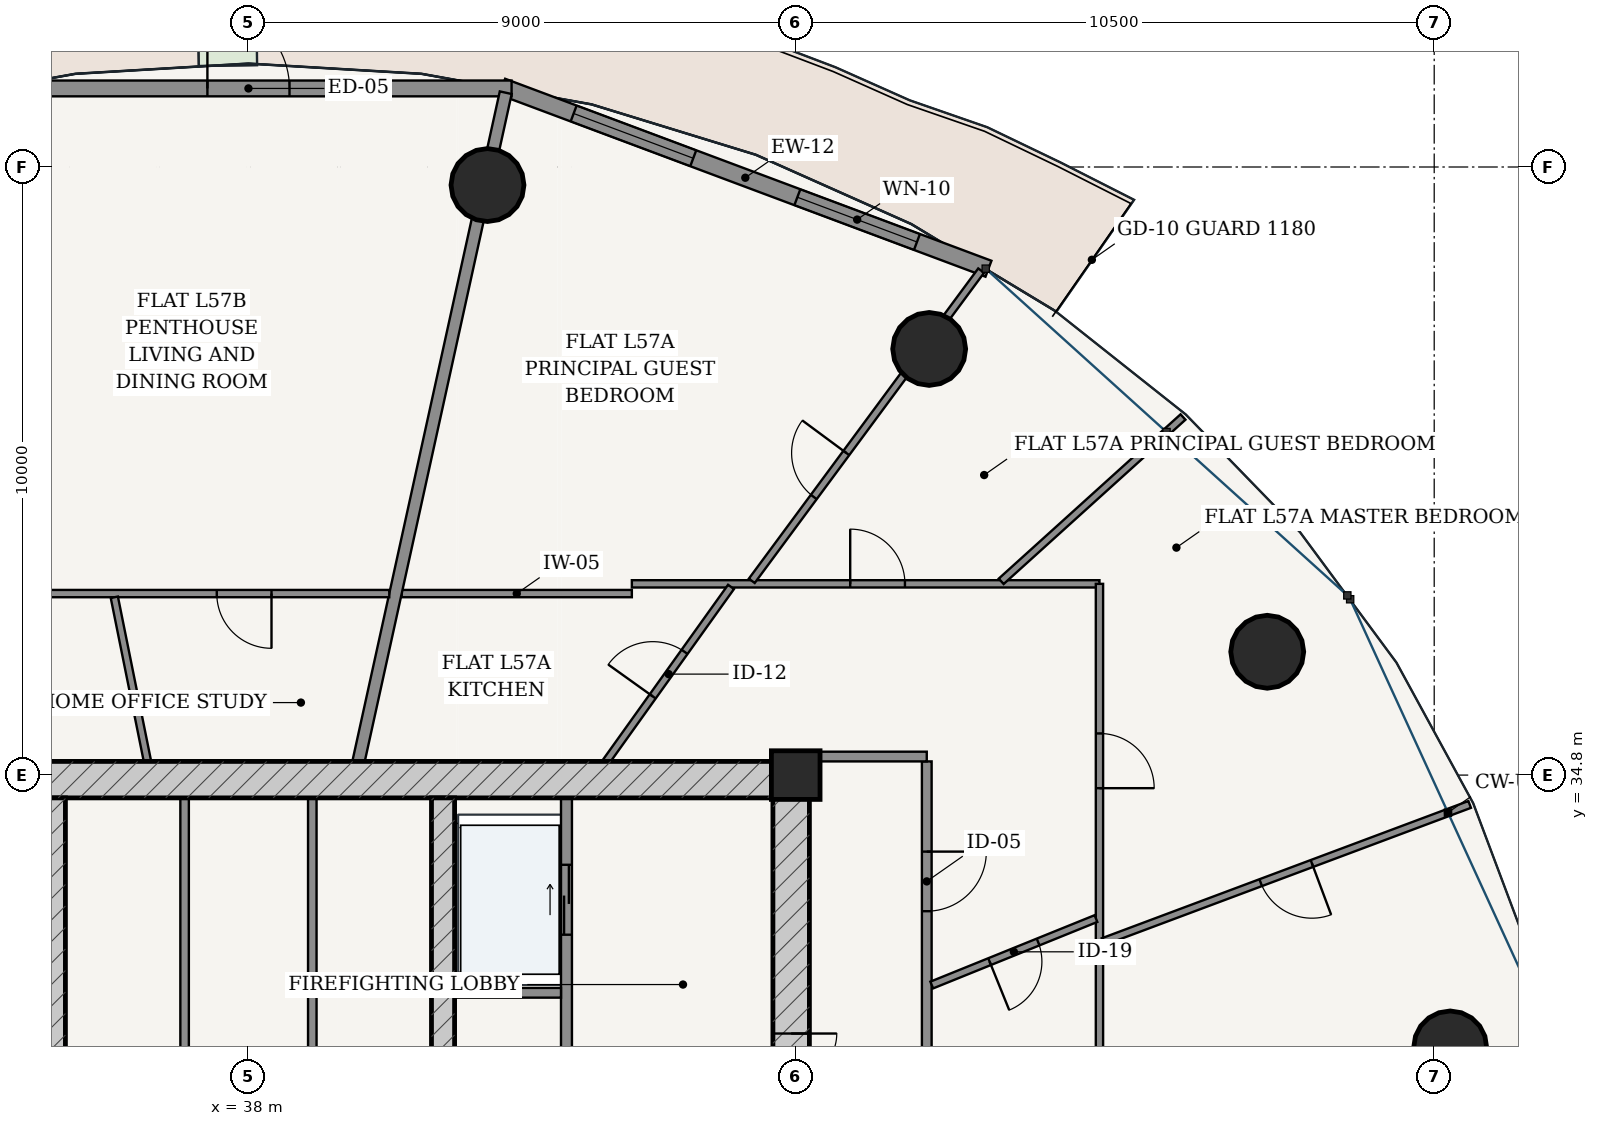
"""IFC4 building model, lengths in metres.
Left out: names, types, materials, properties, quantities, classifications, styles, units other than length and angle.
Written with IfcOpenShell. Run it as: python <this file> out.ifc"""

import sys

from ifc_helpers import new_model, si_unit, direction, frame, frame_2d, origin, origin_2d, place, context, subcontext, project, spatial, rectangle, hollow_circle, extrude, source, transform, mapped, element, fill, save


model = new_model("IFC4")
c1 = context("Model", 3, precision=1e-05, world=origin(), true_north=direction((-0.2419218956, 0.970295726276)))
c2 = subcontext(c1, "Body", "Model", "MODEL_VIEW")
j1 = project(units=[si_unit("LENGTHUNIT", "METRE"), si_unit("PLANEANGLEUNIT", "RADIAN")], contexts=[c1])
p1 = place(None, origin())
s1 = spatial("IfcSite", under=j1, at=p1, CompositionType="ELEMENT")
p2 = place(p1, origin())
s2 = spatial("IfcBuilding", under=s1, at=p2, CompositionType="ELEMENT")
p3 = place(p2, frame((0.0, 0.0, 217.1)))
s3 = spatial("IfcBuildingStorey", under=s2, at=p3, CompositionType="ELEMENT", Elevation=217.1)
p4 = place(p3, frame((47.0, 34.8, 0.0), z_axis=(0.0, 0.0, 1.0), x_axis=(1.0, 0.0, 0.0)))
e1 = element("IfcColumn", 1, at=p4, inside=s3, PredefinedType="COLUMN", context=c2, shape_type="SweptSolid", body=[
    extrude(rectangle(XDim=0.8, YDim=0.8, at=origin_2d()), origin(), (0.0, 0.0, 1.0), 3.7),
])
p5 = place(p3, frame((28.775, 34.725, 0.0), z_axis=(0.0, 0.0, 1.0), x_axis=(1.0, 0.0, 0.0)))
e2 = element("IfcWall", 2, at=p5, inside=s3, PredefinedType="SHEAR", context=c2, shape_type="SweptSolid", body=[
    extrude(rectangle(XDim=18.45, YDim=0.6, at=frame_2d((9.225, 0.0))), origin(), (0.0, 0.0, 1.0), 3.435),
])
p6 = place(p3, frame((46.925, 19.175, 0.0), z_axis=(0.0, 0.0, 1.0), x_axis=(0.0, 1.0, 0.0)))
e3 = element("IfcWall", 3, at=p6, inside=s3, PredefinedType="SHEAR", context=c2, shape_type="SweptSolid", body=[
    extrude(rectangle(XDim=15.25, YDim=0.6, at=frame_2d((7.625, 0.0))), origin(), (0.0, 0.0, 1.0), 3.435),
])
p7 = place(p6, frame((9.875, 0.0, 0.0)))
e4 = element("IfcOpeningElement", 4, at=p7, cuts=e3, PredefinedType="OPENING", context=c2, shape_type="SweptSolid", body=[
    extrude(rectangle(XDim=1.5, YDim=2.2, at=frame_2d((0.75, 1.1))), frame((0.0, 0.31, 0.0), z_axis=(0.0, -1.0, 0.0), x_axis=(1.0, 0.0, 0.0)), (0.0, 0.0, 1.0), 0.62),
])
p8 = place(p3, frame((34.8, 19.175, 0.0), z_axis=(0.0, 0.0, 1.0), x_axis=(0.0, 1.0, 0.0)))
e5 = element("IfcWall", 5, at=p8, inside=s3, PredefinedType="SHEAR", context=c2, shape_type="SweptSolid", body=[
    extrude(rectangle(XDim=15.25, YDim=0.38, at=frame_2d((7.625, 0.0))), origin(), (0.0, 0.0, 1.0), 3.435),
])
p9 = place(p8, frame((7.8, 0.0, 0.0)))
e6 = element("IfcOpeningElement", 6, at=p9, cuts=e5, PredefinedType="OPENING", context=c2, shape_type="SweptSolid", body=[
    extrude(rectangle(XDim=1.05, YDim=2.15, at=frame_2d((0.525, 1.075))), frame((0.0, 0.2, 0.0), z_axis=(0.0, -1.0, 0.0), x_axis=(1.0, 0.0, 0.0)), (0.0, 0.0, 1.0), 0.4),
])
p10 = place(p3, frame((41.2, 19.175, 0.0), z_axis=(0.0, 0.0, 1.0), x_axis=(0.0, 1.0, 0.0)))
e7 = element("IfcWall", 7, at=p10, inside=s3, PredefinedType="SHEAR", context=c2, shape_type="SweptSolid", body=[
    extrude(rectangle(XDim=15.25, YDim=0.38, at=frame_2d((7.625, 0.0))), origin(), (0.0, 0.0, 1.0), 3.435),
])
p11 = place(p10, frame((7.8, 0.0, 0.0)))
e8 = element("IfcOpeningElement", 8, at=p11, cuts=e7, PredefinedType="OPENING", context=c2, shape_type="SweptSolid", body=[
    extrude(rectangle(XDim=1.05, YDim=2.15, at=frame_2d((0.525, 1.075))), frame((0.0, 0.2, 0.0), z_axis=(0.0, -1.0, 0.0), x_axis=(1.0, 0.0, 0.0)), (0.0, 0.0, 1.0), 0.4),
])
for number, where, z_axis, x_axis in (
    (9, (57.763, 30.321, 0.0), (0.0, 0.0, 1.0), (1.0, 0.0, 0.0)),
    (10, (54.754, 36.828, 0.0), (0.0, 0.0, 1.0), (1.0, 0.0, 0.0)),
    (11, (49.195, 41.808, 0.0), (0.0, 0.0, 1.0), (1.0, 0.0, 0.0)),
    (12, (41.931, 44.503, 0.0), (0.0, 0.0, 1.0), (1.0, 0.0, 0.0)),
):
    element("IfcColumn", number, at=place(p3, frame(where, z_axis=z_axis, x_axis=x_axis)), inside=s3, PredefinedType="COLUMN", context=c2, shape_type="SweptSolid", body=[
        extrude(hollow_circle(Radius=0.6, WallThickness=0.038, at=origin_2d()), origin(), (0.0, 0.0, 1.0), 3.7),
    ])
p12 = place(p3, frame((50.17, 43.127, 0.0), z_axis=(0.0, 0.0, 1.0), x_axis=(-0.936556918375, 0.350515532672, 0.0)))
e13 = element("IfcWall", 13, at=p12, inside=s3, PredefinedType="SOLIDWALL", context=c2, shape_type="SweptSolid", body=[
    extrude(rectangle(XDim=8.539, YDim=0.28, at=frame_2d((4.27, 0.0))), origin(), (0.0, 0.0, 1.0), 3.435),
])
p13 = place(p12, frame((1.256, 0.0, 0.85)))
e14 = element("IfcOpeningElement", 14, at=p13, cuts=e13, PredefinedType="OPENING", context=c2, shape_type="SweptSolid", body=[
    extrude(rectangle(XDim=2.1, YDim=1.95, at=frame_2d((1.05, 0.975))), frame((0.0, 0.15, 0.0), z_axis=(0.0, -1.0, 0.0), x_axis=(1.0, 0.0, 0.0)), (0.0, 0.0, 1.0), 0.3),
])
p14 = place(p12, frame((5.184, 0.0, 0.85)))
e15 = element("IfcOpeningElement", 15, at=p14, cuts=e13, PredefinedType="OPENING", context=c2, shape_type="SweptSolid", body=[
    extrude(rectangle(XDim=2.1, YDim=1.95, at=frame_2d((1.05, 0.975))), frame((0.0, 0.15, 0.0), z_axis=(0.0, -1.0, 0.0), x_axis=(1.0, 0.0, 0.0)), (0.0, 0.0, 1.0), 0.3),
])
p15 = place(p3, frame((42.327, 46.092, 0.0), z_axis=(0.0, 0.0, 1.0), x_axis=(-1.0, 0.0, 0.0)))
e16 = element("IfcWall", 16, at=p15, inside=s3, PredefinedType="SOLIDWALL", context=c2, shape_type="SweptSolid", body=[
    extrude(rectangle(XDim=8.654, YDim=0.26, at=frame_2d((4.327, 0.0))), origin(), (0.0, 0.0, 1.0), 3.435),
])
p16 = place(p15, frame((3.652, 0.0, 0.0)))
e17 = element("IfcOpeningElement", 17, at=p16, cuts=e16, PredefinedType="OPENING", context=c2, shape_type="SweptSolid", body=[
    extrude(rectangle(XDim=1.35, YDim=2.2, at=frame_2d((0.675, 1.1))), frame((0.0, 0.14, 0.0), z_axis=(0.0, -1.0, 0.0), x_axis=(1.0, 0.0, 0.0)), (0.0, 0.0, 1.0), 0.28),
])
p17 = place(p3, frame((43.23, 28.52, 0.0), z_axis=(0.0, 0.0, 1.0), x_axis=(0.0, 1.0, 0.0)))
e18 = element("IfcWall", 18, at=p17, inside=s3, PredefinedType="PARTITIONING", context=c2, shape_type="SweptSolid", body=[
    extrude(rectangle(XDim=5.905, YDim=0.18, at=frame_2d((2.953, 0.0))), origin(), (0.0, 0.0, 1.0), 3.435),
])
p18 = place(p17, frame((0.905, 0.0, 0.0)))
e19 = element("IfcOpeningElement", 19, at=p18, cuts=e18, PredefinedType="OPENING", context=c2, shape_type="SweptSolid", body=[
    extrude(rectangle(XDim=0.85, YDim=2.1, at=frame_2d((0.425, 1.05))), frame((0.0, 0.1, 0.0), z_axis=(0.0, -1.0, 0.0), x_axis=(1.0, 0.0, 0.0)), (0.0, 0.0, 1.0), 0.2),
])
p19 = place(p17, frame((3.655, 0.0, 0.0)))
e20 = element("IfcOpeningElement", 20, at=p19, cuts=e18, PredefinedType="OPENING", context=c2, shape_type="SweptSolid", body=[
    extrude(rectangle(XDim=1.15, YDim=2.2, at=frame_2d((0.575, 1.1))), frame((0.0, 0.1, 0.0), z_axis=(0.0, -1.0, 0.0), x_axis=(1.0, 0.0, 0.0)), (0.0, 0.0, 1.0), 0.2),
])
p20 = place(p3, frame((41.39, 31.22, 0.0), z_axis=(0.0, 0.0, 1.0), x_axis=(1.0, 0.0, 0.0)))
e21 = element("IfcWall", 21, at=p20, inside=s3, PredefinedType="PARTITIONING", context=c2, shape_type="SweptSolid", body=[
    extrude(rectangle(XDim=1.75, YDim=0.16, at=frame_2d((0.875, 0.0))), origin(), (0.0, 0.0, 1.0), 3.435),
])
for number, where, z_axis, x_axis in (
    (22, (36.95, 28.56, 0.0), (0.0, 0.0, 1.0), (0.0, 1.0, 0.0)),
    (23, (39.05, 28.56, 0.0), (0.0, 0.0, 1.0), (0.0, 1.0, 0.0)),
):
    element("IfcWall", number, at=place(p3, frame(where, z_axis=z_axis, x_axis=x_axis)), inside=s3, PredefinedType="PARTITIONING", context=c2, shape_type="SweptSolid", body=[
        extrude(rectangle(XDim=5.865, YDim=0.14, at=frame_2d((2.933, 0.0))), origin(), (0.0, 0.0, 1.0), 3.435),
    ])
p21 = place(p3, frame((49.155, 16.725, 0.0), z_axis=(0.0, 0.0, 1.0), x_axis=(0.0, 1.0, 0.0)))
e24 = element("IfcWall", 24, at=p21, inside=s3, PredefinedType="PARTITIONING", context=c2, shape_type="SweptSolid", body=[
    extrude(rectangle(XDim=18.3, YDim=0.16, at=frame_2d((9.15, 0.0))), origin(), (0.0, 0.0, 1.0), 2.951),
])
p22 = place(p21, frame((15.837, 0.0, 0.0)))
e25 = element("IfcOpeningElement", 25, at=p22, cuts=e24, PredefinedType="OPENING", context=c2, shape_type="SweptSolid", body=[
    extrude(rectangle(XDim=0.98, YDim=2.2, at=frame_2d((0.49, 1.1))), frame((0.0, 0.09, 0.0), z_axis=(0.0, -1.0, 0.0), x_axis=(1.0, 0.0, 0.0)), (0.0, 0.0, 1.0), 0.18),
])
p23 = place(p3, frame((47.225, 35.105, 0.0), z_axis=(0.0, 0.0, 1.0), x_axis=(1.0, 0.0, 0.0)))
e26 = element("IfcWall", 26, at=p23, inside=s3, PredefinedType="PARTITIONING", context=c2, shape_type="SweptSolid", body=[
    extrude(rectangle(XDim=1.93, YDim=0.16, at=frame_2d((0.965, 0.0))), origin(), (0.0, 0.0, 1.0), 3.435),
])
p24 = place(p3, frame((40.52, 37.785, 0.0), z_axis=(0.0, 0.0, 1.0), x_axis=(1.0, 0.0, 0.0)))
e27 = element("IfcWall", 27, at=p24, inside=s3, PredefinedType="PARTITIONING", context=c2, shape_type="SweptSolid", body=[
    extrude(rectangle(XDim=3.785, YDim=0.12, at=frame_2d((1.893, 0.0))), origin(), (0.0, 0.0, 1.0), 2.951),
])
p25 = place(p3, frame((44.305, 37.945, 0.0), z_axis=(0.0, 0.0, 1.0), x_axis=(1.0, 0.0, 0.0)))
e28 = element("IfcWall", 28, at=p25, inside=s3, PredefinedType="PARTITIONING", context=c2, shape_type="SweptSolid", body=[
    extrude(rectangle(XDim=7.69, YDim=0.12, at=frame_2d((3.845, 0.0))), origin(), (0.0, 0.0, 1.0), 2.951),
])
p26 = place(p25, frame((3.591, 0.0, 0.0)))
e29 = element("IfcOpeningElement", 29, at=p26, cuts=e28, PredefinedType="OPENING", context=c2, shape_type="SweptSolid", body=[
    extrude(rectangle(XDim=0.9, YDim=2.15, at=frame_2d((0.45, 1.075))), frame((0.0, 0.07, 0.0), z_axis=(0.0, -1.0, 0.0), x_axis=(1.0, 0.0, 0.0)), (0.0, 0.0, 1.0), 0.14),
])
p27 = place(p3, frame((51.995, 37.945, 0.0), z_axis=(0.0, 0.0, 1.0), x_axis=(0.0, -1.0, 0.0)))
e30 = element("IfcWall", 30, at=p27, inside=s3, PredefinedType="PARTITIONING", context=c2, shape_type="SweptSolid", body=[
    extrude(rectangle(XDim=11.043, YDim=0.12, at=frame_2d((5.521, 0.0))), origin(), (0.0, 0.0, 1.0), 2.951),
])
p28 = place(p27, frame((2.46, 0.0, 0.0)))
e31 = element("IfcOpeningElement", 31, at=p28, cuts=e30, PredefinedType="OPENING", context=c2, shape_type="SweptSolid", body=[
    extrude(rectangle(XDim=0.9, YDim=2.15, at=frame_2d((0.45, 1.075))), frame((0.0, 0.07, 0.0), z_axis=(0.0, -1.0, 0.0), x_axis=(1.0, 0.0, 0.0)), (0.0, 0.0, 1.0), 0.14),
])
p29 = place(p3, frame((52.053, 32.06, 0.0), z_axis=(0.0, 0.0, 1.0), x_axis=(0.936547148815, 0.350541635255, 0.0)))
e32 = element("IfcWall", 32, at=p29, inside=s3, PredefinedType="PARTITIONING", context=c2, shape_type="SweptSolid", body=[
    extrude(rectangle(XDim=6.439, YDim=0.12, at=frame_2d((3.219, 0.0))), origin(), (0.0, 0.0, 1.0), 2.951),
])
p30 = place(p29, frame((2.769, 0.0, 0.0)))
e33 = element("IfcOpeningElement", 33, at=p30, cuts=e32, PredefinedType="OPENING", context=c2, shape_type="SweptSolid", body=[
    extrude(rectangle(XDim=0.9, YDim=2.15, at=frame_2d((0.45, 1.075))), frame((0.0, 0.07, 0.0), z_axis=(0.0, -1.0, 0.0), x_axis=(1.0, 0.0, 0.0)), (0.0, 0.0, 1.0), 0.14),
])
p31 = place(p3, frame((50.379, 37.987, 0.0), z_axis=(0.0, 0.0, 1.0), x_axis=(0.741946116474, 0.67045951425, 0.0)))
e34 = element("IfcWall", 34, at=p31, inside=s3, PredefinedType="PARTITIONING", context=c2, shape_type="SweptSolid", body=[
    extrude(rectangle(XDim=4.03, YDim=0.12, at=frame_2d((2.015, 0.0))), origin(), (0.0, 0.0, 1.0), 2.951),
])
p32 = place(p3, frame((46.278, 37.995, 0.0), z_axis=(0.0, 0.0, 1.0), x_axis=(0.594518724985, 0.80408176552, 0.0)))
e35 = element("IfcWall", 35, at=p32, inside=s3, PredefinedType="PARTITIONING", context=c2, shape_type="SweptSolid", body=[
    extrude(rectangle(XDim=6.344, YDim=0.12, at=frame_2d((3.172, 0.0))), origin(), (0.0, 0.0, 1.0), 2.951),
])
p33 = place(p32, frame((1.715, 0.0, 0.0)))
e36 = element("IfcOpeningElement", 36, at=p33, cuts=e35, PredefinedType="OPENING", context=c2, shape_type="SweptSolid", body=[
    extrude(rectangle(XDim=0.9, YDim=2.15, at=frame_2d((0.45, 1.075))), frame((0.0, 0.07, 0.0), z_axis=(0.0, -1.0, 0.0), x_axis=(1.0, 0.0, 0.0)), (0.0, 0.0, 1.0), 0.14),
])
p34 = place(p3, frame((49.237, 31.347, 0.0), z_axis=(0.0, 0.0, 1.0), x_axis=(0.926960690293, 0.375158471383, 0.0)))
e37 = element("IfcWall", 37, at=p34, inside=s3, PredefinedType="PARTITIONING", context=c2, shape_type="SweptSolid", body=[
    extrude(rectangle(XDim=2.914, YDim=0.12, at=frame_2d((1.457, 0.0))), origin(), (0.0, 0.0, 1.0), 3.11),
])
p35 = place(p34, frame((1.027, 0.0, 0.0)))
e38 = element("IfcOpeningElement", 38, at=p35, cuts=e37, PredefinedType="OPENING", context=c2, shape_type="SweptSolid", body=[
    extrude(rectangle(XDim=0.86, YDim=2.15, at=frame_2d((0.43, 1.075))), frame((0.0, 0.07, 0.0), z_axis=(0.0, -1.0, 0.0), x_axis=(1.0, 0.0, 0.0)), (0.0, 0.0, 1.0), 0.14),
])
p36 = place(p3, frame((43.885, 35.027, 0.0), z_axis=(0.0, 0.0, 1.0), x_axis=(0.581801309538, 0.813330951225, 0.0)))
e39 = element("IfcWall", 39, at=p36, inside=s3, PredefinedType="PARTITIONING", context=c2, shape_type="SweptSolid", body=[
    extrude(rectangle(XDim=3.526, YDim=0.12, at=frame_2d((1.763, 0.0))), origin(), (0.0, 0.0, 1.0), 3.435),
])
p37 = place(p36, frame((1.313, 0.0, 0.0)))
e40 = element("IfcOpeningElement", 40, at=p37, cuts=e39, PredefinedType="OPENING", context=c2, shape_type="SweptSolid", body=[
    extrude(rectangle(XDim=0.9, YDim=2.15, at=frame_2d((0.45, 1.075))), frame((0.0, 0.07, 0.0), z_axis=(0.0, -1.0, 0.0), x_axis=(1.0, 0.0, 0.0)), (0.0, 0.0, 1.0), 0.14),
])
p38 = place(p3, frame((39.811, 35.027, 0.0), z_axis=(0.0, 0.0, 1.0), x_axis=(0.214966857327, 0.976621344356, 0.0)))
e41 = element("IfcWall", 41, at=p38, inside=s3, PredefinedType="PARTITIONING", context=c2, shape_type="SweptSolid", body=[
    extrude(rectangle(XDim=11.258, YDim=0.2, at=frame_2d((5.629, 0.0))), origin(), (0.0, 0.0, 1.0), 2.52),
])
p39 = place(p3, frame((31.695, 37.785, 0.0), z_axis=(0.0, 0.0, 1.0), x_axis=(1.0, 0.0, 0.0)))
e42 = element("IfcWall", 42, at=p39, inside=s3, PredefinedType="PARTITIONING", context=c2, shape_type="SweptSolid", body=[
    extrude(rectangle(XDim=8.621, YDim=0.12, at=frame_2d((4.311, 0.0))), origin(), (0.0, 0.0, 1.0), 2.951),
])
p40 = place(p39, frame((1.716, 0.0, 0.0)))
e43 = element("IfcOpeningElement", 43, at=p40, cuts=e42, PredefinedType="OPENING", context=c2, shape_type="SweptSolid", body=[
    extrude(rectangle(XDim=0.9, YDim=2.15, at=frame_2d((0.45, 1.075))), frame((0.0, 0.07, 0.0), z_axis=(0.0, -1.0, 0.0), x_axis=(1.0, 0.0, 0.0)), (0.0, 0.0, 1.0), 0.14),
])
p41 = place(p39, frame((5.784, 0.0, 0.0)))
e44 = element("IfcOpeningElement", 44, at=p41, cuts=e42, PredefinedType="OPENING", context=c2, shape_type="SweptSolid", body=[
    extrude(rectangle(XDim=0.9, YDim=2.15, at=frame_2d((0.45, 1.075))), frame((0.0, 0.07, 0.0), z_axis=(0.0, -1.0, 0.0), x_axis=(1.0, 0.0, 0.0)), (0.0, 0.0, 1.0), 0.14),
])
p42 = place(p3, frame((36.339, 35.027, 0.0), z_axis=(0.0, 0.0, 1.0), x_axis=(-0.197856196381, 0.980231057228, 0.0)))
e45 = element("IfcWall", 45, at=p42, inside=s3, PredefinedType="PARTITIONING", context=c2, shape_type="SweptSolid", body=[
    extrude(rectangle(XDim=2.752, YDim=0.12, at=frame_2d((1.376, 0.0))), origin(), (0.0, 0.0, 1.0), 2.52),
])
m1 = source(origin(), c2, "Body", "SweptSolid", [
    extrude(rectangle(XDim=2.1, YDim=1.95, at=frame_2d((1.05, 0.975))), frame((0.0, 0.03, 0.0), z_axis=(0.0, -1.0, 0.0), x_axis=(1.0, 0.0, 0.0)), (0.0, 0.0, 1.0), 0.06),
])
p43 = place(p13, origin())
e46 = element("IfcWindow", 46, at=p43, inside=s3, PartitioningType="SINGLE_PANEL", PredefinedType="WINDOW", context=c2, shape_type="MappedRepresentation", body=[
    mapped(m1, transform((0.0, 0.0, 0.0), scale=1.0)),
])
fill(e14, e46)
p44 = place(p14, origin())
e47 = element("IfcWindow", 47, at=p44, inside=s3, PartitioningType="SINGLE_PANEL", PredefinedType="WINDOW", context=c2, shape_type="MappedRepresentation", body=[
    mapped(m1, transform((0.0, 0.0, 0.0), scale=1.0)),
])
fill(e15, e47)
m2 = source(origin(), c2, "Body", "SweptSolid", [
    extrude(rectangle(XDim=1.35, YDim=2.2, at=frame_2d((0.675, 1.1))), frame((0.0, 0.025, 0.0), z_axis=(0.0, -1.0, 0.0), x_axis=(1.0, 0.0, 0.0)), (0.0, 0.0, 1.0), 0.05),
])
p45 = place(p16, frame((1.35, 0.0, 0.0), z_axis=(0.0, 0.0, 1.0), x_axis=(-1.0, 0.0, 0.0)))
e48 = element("IfcDoor", 48, at=p45, inside=s3, OperationType="SINGLE_SWING_LEFT", PredefinedType="DOOR", context=c2, shape_type="MappedRepresentation", body=[
    mapped(m2, transform((0.0, 0.0, 0.0), scale=1.0)),
])
fill(e17, e48)
m3 = source(origin(), c2, "Body", "SweptSolid", [
    extrude(rectangle(XDim=1.5, YDim=2.2, at=frame_2d((0.75, 1.1))), frame((0.0, 0.025, 0.0), z_axis=(0.0, -1.0, 0.0), x_axis=(1.0, 0.0, 0.0)), (0.0, 0.0, 1.0), 0.05),
])
p46 = place(p7, frame((1.5, 0.0, 0.0), z_axis=(0.0, 0.0, 1.0), x_axis=(-1.0, 0.0, 0.0)))
e49 = element("IfcDoor", 49, at=p46, inside=s3, OperationType="DOUBLE_DOOR_SINGLE_SWING", PredefinedType="DOOR", context=c2, shape_type="MappedRepresentation", body=[
    mapped(m3, transform((0.0, 0.0, 0.0), scale=1.0)),
])
fill(e4, e49)
m4 = source(origin(), c2, "Body", "SweptSolid", [
    extrude(rectangle(XDim=1.15, YDim=2.2, at=frame_2d((0.575, 1.1))), frame((0.0, 0.025, 0.0), z_axis=(0.0, -1.0, 0.0), x_axis=(1.0, 0.0, 0.0)), (0.0, 0.0, 1.0), 0.05),
])
p47 = place(p19, origin())
e50 = element("IfcDoor", 50, at=p47, inside=s3, OperationType="DOUBLE_DOOR_SLIDING", PredefinedType="DOOR", context=c2, shape_type="MappedRepresentation", body=[
    mapped(m4, transform((0.0, 0.0, 0.0), scale=1.0)),
])
fill(e20, e50)
m5 = source(origin(), c2, "Body", "SweptSolid", [
    extrude(rectangle(XDim=0.98, YDim=2.2, at=frame_2d((0.49, 1.1))), frame((0.0, 0.025, 0.0), z_axis=(0.0, -1.0, 0.0), x_axis=(1.0, 0.0, 0.0)), (0.0, 0.0, 1.0), 0.05),
])
p48 = place(p22, frame((0.98, 0.0, 0.0), z_axis=(0.0, 0.0, 1.0), x_axis=(-1.0, 0.0, 0.0)))
e51 = element("IfcDoor", 51, at=p48, inside=s3, OperationType="SINGLE_SWING_LEFT", PredefinedType="DOOR", context=c2, shape_type="MappedRepresentation", body=[
    mapped(m5, transform((0.0, 0.0, 0.0), scale=1.0)),
])
fill(e25, e51)
m6 = source(origin(), c2, "Body", "SweptSolid", [
    extrude(rectangle(XDim=0.86, YDim=2.15, at=frame_2d((0.43, 1.075))), frame((0.0, 0.025, 0.0), z_axis=(0.0, -1.0, 0.0), x_axis=(1.0, 0.0, 0.0)), (0.0, 0.0, 1.0), 0.05),
])
p49 = place(p35, frame((0.86, 0.0, 0.0), z_axis=(0.0, 0.0, 1.0), x_axis=(-1.0, 0.0, 0.0)))
e52 = element("IfcDoor", 52, at=p49, inside=s3, OperationType="SINGLE_SWING_RIGHT", PredefinedType="DOOR", context=c2, shape_type="MappedRepresentation", body=[
    mapped(m6, transform((0.0, 0.0, 0.0), scale=1.0)),
])
fill(e38, e52)
m7 = source(origin(), c2, "Body", "SweptSolid", [
    extrude(rectangle(XDim=0.9, YDim=2.15, at=frame_2d((0.45, 1.075))), frame((0.0, 0.025, 0.0), z_axis=(0.0, -1.0, 0.0), x_axis=(1.0, 0.0, 0.0)), (0.0, 0.0, 1.0), 0.05),
])
p50 = place(p37, origin())
e53 = element("IfcDoor", 53, at=p50, inside=s3, OperationType="SINGLE_SWING_LEFT", PredefinedType="DOOR", context=c2, shape_type="MappedRepresentation", body=[
    mapped(m7, transform((0.0, 0.0, 0.0), scale=1.0)),
])
fill(e40, e53)
p51 = place(p28, origin())
e54 = element("IfcDoor", 54, at=p51, inside=s3, OperationType="SINGLE_SWING_RIGHT", PredefinedType="DOOR", context=c2, shape_type="MappedRepresentation", body=[
    mapped(m7, transform((0.0, 0.0, 0.0), scale=1.0)),
])
fill(e31, e54)
p52 = place(p26, origin())
e55 = element("IfcDoor", 55, at=p52, inside=s3, OperationType="SINGLE_SWING_LEFT", PredefinedType="DOOR", context=c2, shape_type="MappedRepresentation", body=[
    mapped(m7, transform((0.0, 0.0, 0.0), scale=1.0)),
])
fill(e29, e55)
p53 = place(p33, origin())
e56 = element("IfcDoor", 56, at=p53, inside=s3, OperationType="SINGLE_SWING_RIGHT", PredefinedType="DOOR", context=c2, shape_type="MappedRepresentation", body=[
    mapped(m7, transform((0.0, 0.0, 0.0), scale=1.0)),
])
fill(e36, e56)
p54 = place(p30, frame((0.9, 0.0, 0.0), z_axis=(0.0, 0.0, 1.0), x_axis=(-1.0, 0.0, 0.0)))
e57 = element("IfcDoor", 57, at=p54, inside=s3, OperationType="SINGLE_SWING_LEFT", PredefinedType="DOOR", context=c2, shape_type="MappedRepresentation", body=[
    mapped(m7, transform((0.0, 0.0, 0.0), scale=1.0)),
])
fill(e33, e57)
p55 = place(p41, frame((0.9, 0.0, 0.0), z_axis=(0.0, 0.0, 1.0), x_axis=(-1.0, 0.0, 0.0)))
e58 = element("IfcDoor", 58, at=p55, inside=s3, OperationType="SINGLE_SWING_LEFT", PredefinedType="DOOR", context=c2, shape_type="MappedRepresentation", body=[
    mapped(m7, transform((0.0, 0.0, 0.0), scale=1.0)),
])
fill(e44, e58)
save(model, sys.argv[1])
